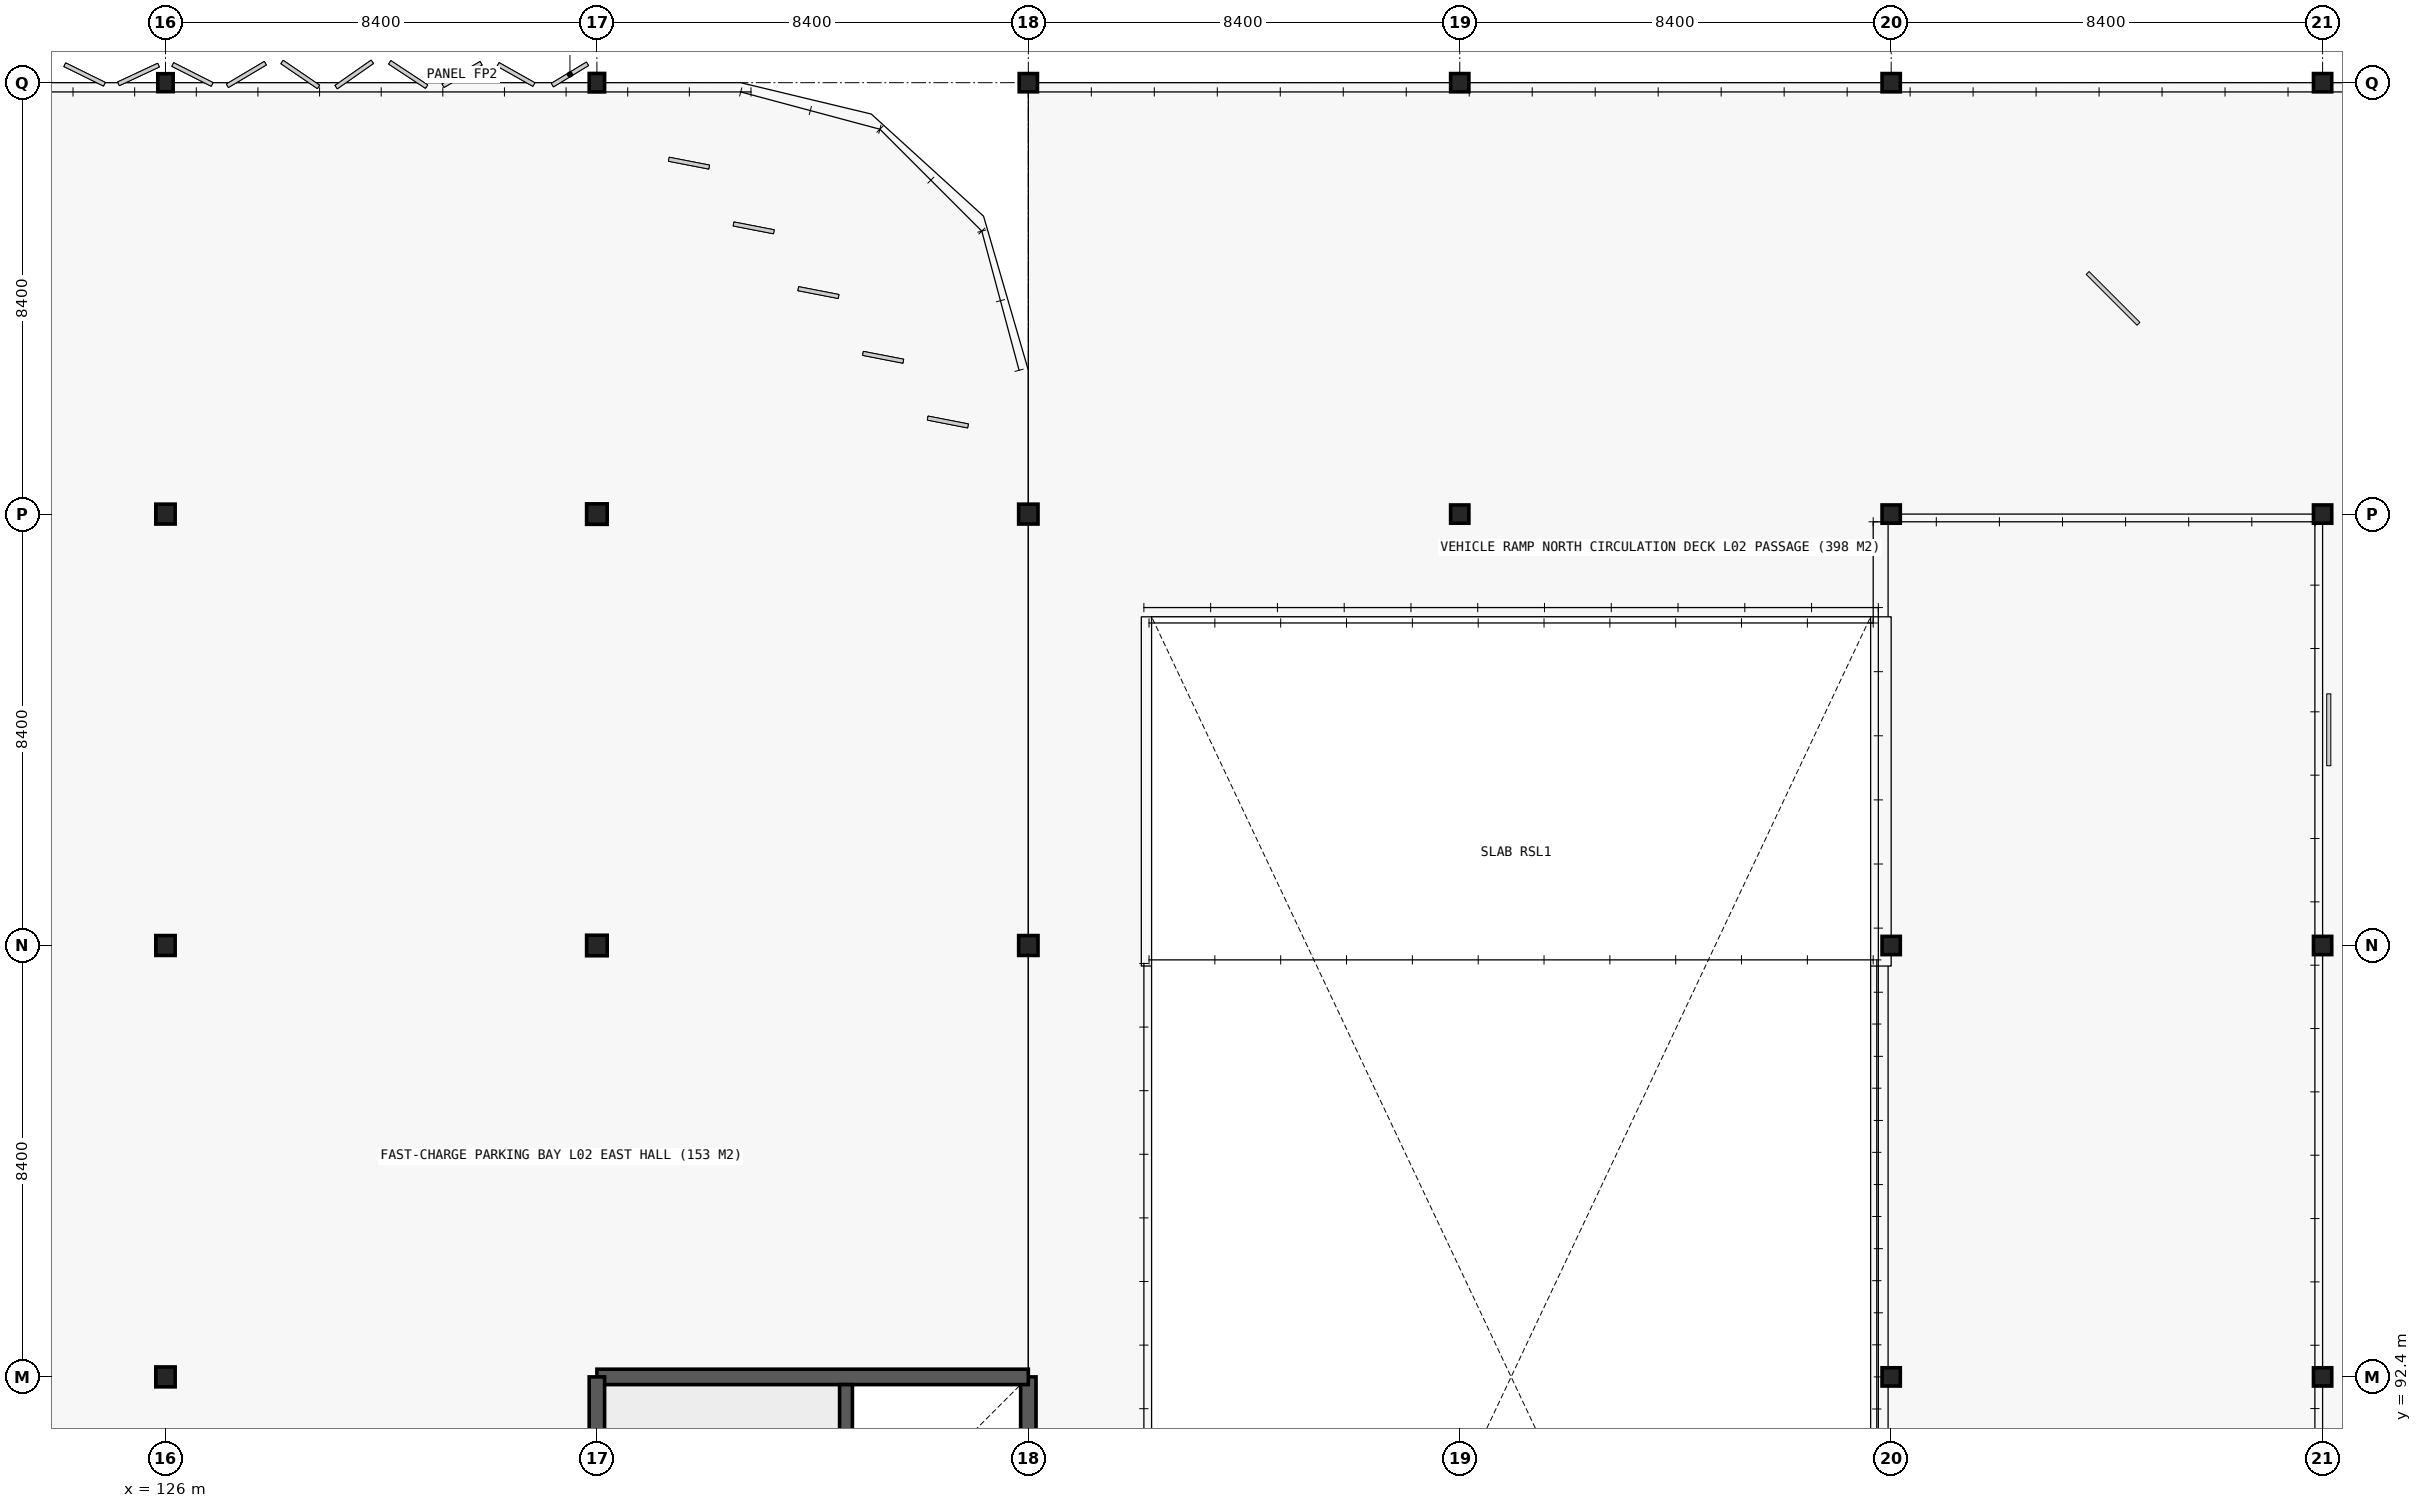
"""IFC4 building model, lengths in metres.
Left out: names, types, materials, properties, quantities, classifications, styles, units other than length and angle.
Written with IfcOpenShell. Run it as: python <this file> out.ifc"""

import sys

from ifc_helpers import new_model, si_unit, direction, frame, frame_2d, origin, origin_2d, place, context, subcontext, project, spatial, rectangle, hollow_circle, i_section, extrude, element, save


model = new_model("IFC4")
c1 = context("Model", 3, precision=1e-05, world=origin(), true_north=direction((0.0, 1.0)))
c2 = subcontext(c1, "Body", "Model", "MODEL_VIEW")
j1 = project(units=[si_unit("LENGTHUNIT", "METRE"), si_unit("PLANEANGLEUNIT", "RADIAN")], contexts=[c1])
p1 = place(None, origin())
s1 = spatial("IfcSite", under=j1, at=p1, CompositionType="ELEMENT")
p2 = place(p1, origin())
s2 = spatial("IfcBuilding", under=s1, at=p2, CompositionType="ELEMENT")
p3 = place(p2, frame((0.0, 0.0, 9.0)))
s3 = spatial("IfcBuildingStorey", under=s2, at=p3, CompositionType="ELEMENT", Elevation=9.0)
p4 = place(p3, frame((142.8, 84.0, 0.0), z_axis=(0.0, 0.0, 1.0), x_axis=(0.0, 1.0, 0.0)))
e1 = element("IfcWall", 1, at=p4, inside=s3, PredefinedType="SHEAR", context=c2, shape_type="SweptSolid", body=[
    extrude(rectangle(XDim=8.4, YDim=0.3, at=frame_2d((4.2, 0.0))), origin(), (0.0, 0.0, 1.0), 4.2),
])
p5 = place(p3, frame((142.8, 92.4, 0.0), z_axis=(0.0, 0.0, 1.0), x_axis=(-1.0, 0.0, 0.0)))
e2 = element("IfcWall", 2, at=p5, inside=s3, PredefinedType="SHEAR", context=c2, shape_type="SweptSolid", body=[
    extrude(rectangle(XDim=8.4, YDim=0.3, at=frame_2d((4.2, 0.0))), origin(), (0.0, 0.0, 1.0), 4.2),
])
p6 = place(p3, frame((134.4, 92.4, 0.0), z_axis=(0.0, 0.0, 1.0), x_axis=(0.0, -1.0, 0.0)))
e3 = element("IfcWall", 3, at=p6, inside=s3, PredefinedType="SHEAR", context=c2, shape_type="SweptSolid", body=[
    extrude(rectangle(XDim=8.4, YDim=0.3, at=frame_2d((4.2, 0.0))), origin(), (0.0, 0.0, 1.0), 4.2),
])
p7 = place(p3, frame((139.25, 84.15, 0.0), z_axis=(0.0, 0.0, 1.0), x_axis=(0.0, 1.0, 0.0)))
e4 = element("IfcWall", 4, at=p7, inside=s3, PredefinedType="SHEAR", context=c2, shape_type="SweptSolid", body=[
    extrude(rectangle(XDim=8.1, YDim=0.25, at=frame_2d((4.05, 0.0))), origin(), (0.0, 0.0, 1.0), 4.2),
])
for number, where, z_axis, x_axis in (
    (5, (126.0, 92.4, 0.0), (0.0, 0.0, 1.0), (1.0, 0.0, 0.0)),
    (6, (126.0, 100.8, 0.0), (0.0, 0.0, 1.0), (1.0, 0.0, 0.0)),
    (7, (126.0, 109.2, 0.0), (0.0, 0.0, 1.0), (1.0, 0.0, 0.0)),
):
    element("IfcColumn", number, at=place(p3, frame(where, z_axis=z_axis, x_axis=x_axis)), inside=s3, PredefinedType="COLUMN", context=c2, shape_type="SweptSolid", body=[
        extrude(i_section(OverallWidth=0.377, OverallDepth=0.387, WebThickness=0.022, FlangeThickness=0.036, FilletRadius=0.015, at=origin_2d()), origin(), (0.0, 0.0, 1.0), 4.2),
    ])
p8 = place(p3, frame((126.0, 117.6, 0.0), z_axis=(0.0, 0.0, 1.0), x_axis=(1.0, 0.0, 0.0)))
e8 = element("IfcColumn", 8, at=p8, inside=s3, PredefinedType="COLUMN", context=c2, shape_type="SweptSolid", body=[
    extrude(i_section(OverallWidth=0.3, OverallDepth=0.35, WebThickness=0.01, FlangeThickness=0.018, FilletRadius=0.027, at=origin_2d()), origin(), (0.0, 0.0, 1.0), 4.2),
])
for number, where, z_axis, x_axis in (
    (9, (134.4, 100.8, 0.0), (0.0, 0.0, 1.0), (1.0, 0.0, 0.0)),
    (10, (134.4, 109.2, 0.0), (0.0, 0.0, 1.0), (1.0, 0.0, 0.0)),
):
    element("IfcColumn", number, at=place(p3, frame(where, z_axis=z_axis, x_axis=x_axis)), inside=s3, PredefinedType="COLUMN", context=c2, shape_type="SweptSolid", body=[
        extrude(i_section(OverallWidth=0.401, OverallDepth=0.399, WebThickness=0.025, FlangeThickness=0.04, FilletRadius=0.015, at=origin_2d()), origin(), (0.0, 0.0, 1.0), 4.2),
    ])
p9 = place(p3, frame((134.4, 117.6, 0.0), z_axis=(0.0, 0.0, 1.0), x_axis=(1.0, 0.0, 0.0)))
e11 = element("IfcColumn", 11, at=p9, inside=s3, PredefinedType="COLUMN", context=c2, shape_type="SweptSolid", body=[
    extrude(i_section(OverallWidth=0.3, OverallDepth=0.36, WebThickness=0.012, FlangeThickness=0.022, FilletRadius=0.027, at=origin_2d()), origin(), (0.0, 0.0, 1.0), 4.2),
])
for number, where, z_axis, x_axis in (
    (12, (142.8, 100.8, 0.0), (0.0, 0.0, 1.0), (1.0, 0.0, 0.0)),
    (13, (142.8, 109.2, 0.0), (0.0, 0.0, 1.0), (1.0, 0.0, 0.0)),
):
    element("IfcColumn", number, at=place(p3, frame(where, z_axis=z_axis, x_axis=x_axis)), inside=s3, PredefinedType="COLUMN", context=c2, shape_type="SweptSolid", body=[
        extrude(i_section(OverallWidth=0.377, OverallDepth=0.387, WebThickness=0.022, FlangeThickness=0.036, FilletRadius=0.015, at=origin_2d()), origin(), (0.0, 0.0, 1.0), 4.2),
    ])
for number, where, z_axis, x_axis in (
    (14, (142.8, 117.6, 0.0), (0.0, 0.0, 1.0), (1.0, 0.0, 0.0)),
    (15, (151.2, 109.2, 0.0), (0.0, 0.0, 1.0), (1.0, 0.0, 0.0)),
    (16, (151.2, 117.6, 0.0), (0.0, 0.0, 1.0), (1.0, 0.0, 0.0)),
    (17, (159.6, 92.4, 0.0), (0.0, 0.0, 1.0), (1.0, 0.0, 0.0)),
    (18, (159.6, 100.8, 0.0), (0.0, 0.0, 1.0), (1.0, 0.0, 0.0)),
    (19, (159.6, 109.2, 0.0), (0.0, 0.0, 1.0), (1.0, 0.0, 0.0)),
    (20, (159.6, 117.6, 0.0), (0.0, 0.0, 1.0), (1.0, 0.0, 0.0)),
    (21, (168.0, 92.4, 0.0), (0.0, 0.0, 1.0), (1.0, 0.0, 0.0)),
    (22, (168.0, 100.8, 0.0), (0.0, 0.0, 1.0), (1.0, 0.0, 0.0)),
    (23, (168.0, 109.2, 0.0), (0.0, 0.0, 1.0), (1.0, 0.0, 0.0)),
    (24, (168.0, 117.6, 0.0), (0.0, 0.0, 1.0), (1.0, 0.0, 0.0)),
):
    element("IfcColumn", number, at=place(p3, frame(where, z_axis=z_axis, x_axis=x_axis)), inside=s3, PredefinedType="COLUMN", context=c2, shape_type="SweptSolid", body=[
        extrude(hollow_circle(Radius=0.178, WallThickness=0.01, at=origin_2d()), origin(), (0.0, 0.0, 1.0), 4.2),
    ])
save(model, sys.argv[1])
